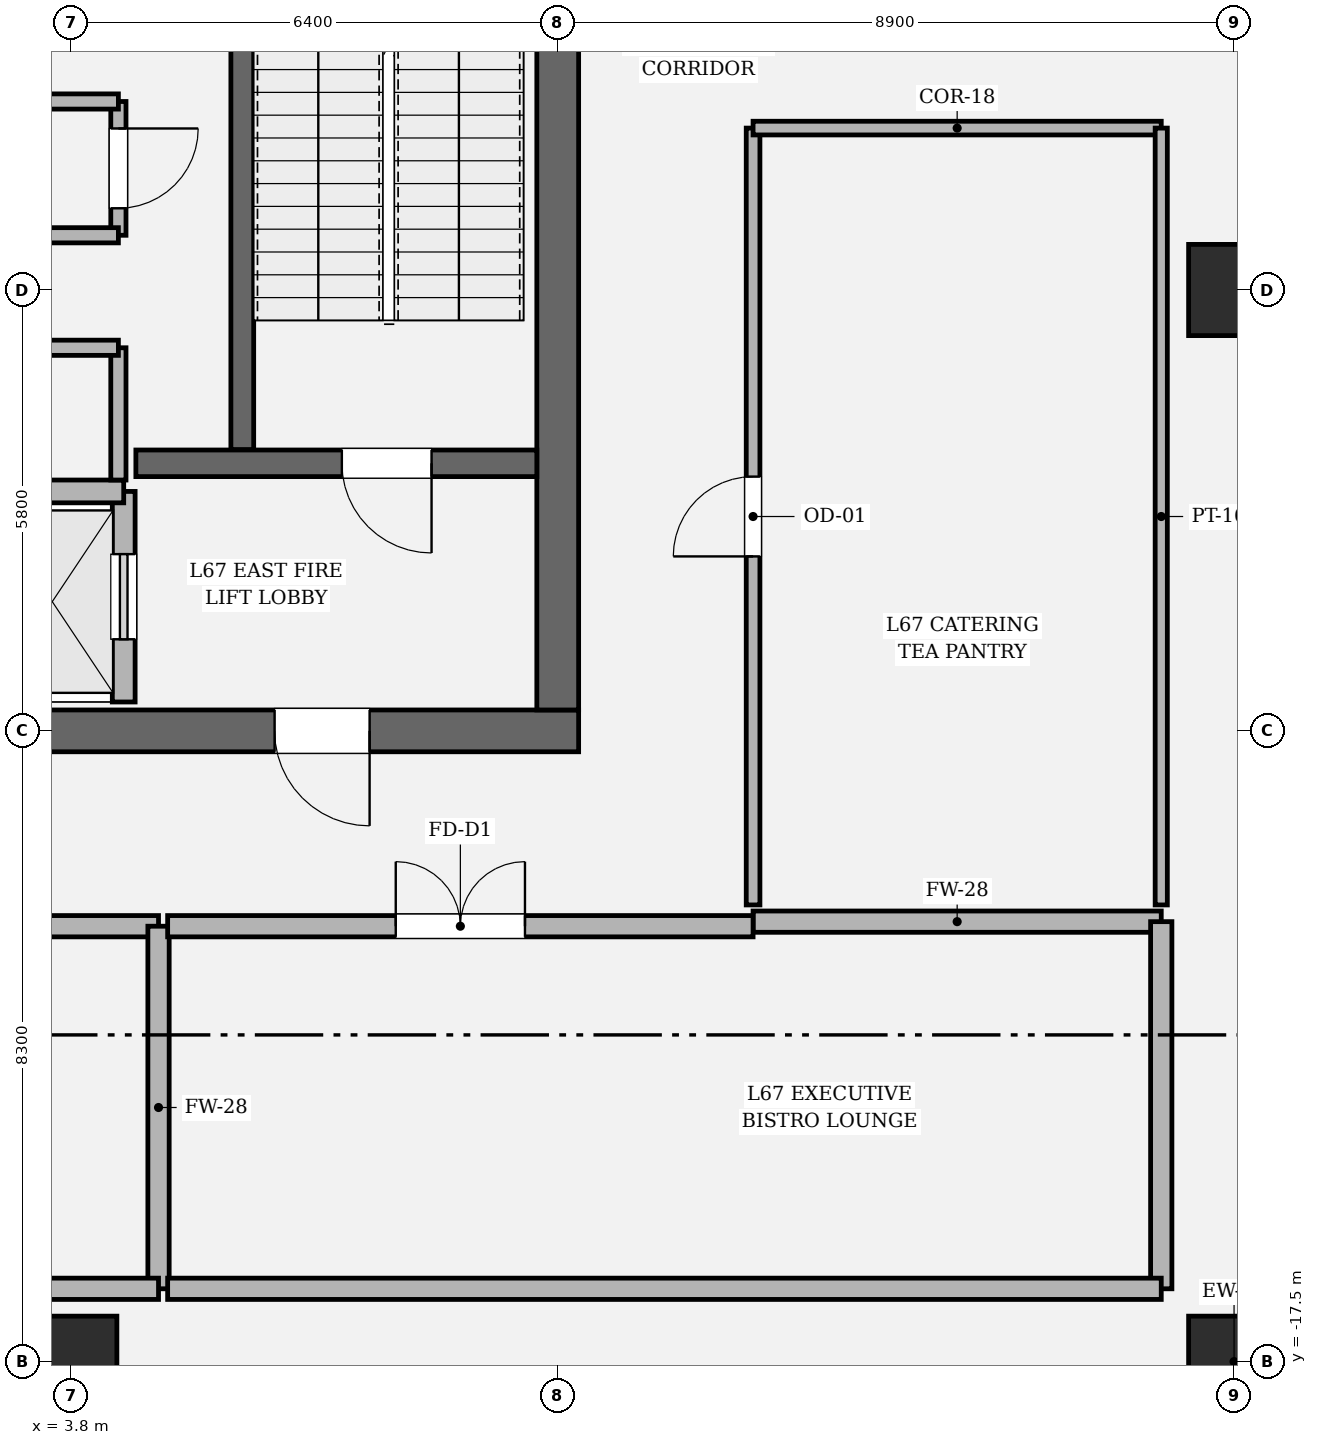
"""IFC4 building model, lengths in metres.
Left out: names, types, materials, properties, quantities, classifications, styles, units other than length and angle.
Written with IfcOpenShell. Run it as: python <this file> out.ifc"""

import sys

from ifc_helpers import new_model, si_unit, direction, frame, frame_2d, origin, origin_2d, place, context, subcontext, project, spatial, rectangle, hollow_rectangle, extrude, element, fill, save


model = new_model("IFC4")
c1 = context("Model", 3, precision=1e-05, world=origin(), true_north=direction((0.0, 1.0)))
c2 = subcontext(c1, "Body", "Model", "MODEL_VIEW")
j1 = project(units=[si_unit("LENGTHUNIT", "METRE"), si_unit("PLANEANGLEUNIT", "RADIAN")], contexts=[c1])
p1 = place(None, origin())
s1 = spatial("IfcSite", under=j1, at=p1, CompositionType="ELEMENT")
p2 = place(p1, origin())
s2 = spatial("IfcBuilding", under=s1, at=p2, CompositionType="ELEMENT")
p3 = place(p2, frame((0.0, 0.0, 283.8)))
s3 = spatial("IfcBuildingStorey", under=s2, at=p3, CompositionType="ELEMENT", Elevation=283.8)
p4 = place(p3, frame((10.475, -9.2, 0.0), z_axis=(0.0, 0.0, 1.0), x_axis=(-1.0, 0.0, 0.0)))
e1 = element("IfcWall", 1, at=p4, inside=s3, PredefinedType="SHEAR", context=c2, shape_type="SweptSolid", body=[
    extrude(rectangle(XDim=20.95, YDim=0.55, at=frame_2d((10.475, 0.0))), origin(), (0.0, 0.0, 1.0), 4.2),
])
p5 = place(p4, frame((2.75, 0.0, 0.0)))
e2 = element("IfcOpeningElement", 2, at=p5, cuts=e1, PredefinedType="OPENING", context=c2, shape_type="SweptSolid", body=[
    extrude(rectangle(XDim=1.25, YDim=2.25, at=frame_2d((0.625, 1.125))), frame((0.0, 0.285, 0.0), z_axis=(0.0, -1.0, 0.0), x_axis=(1.0, 0.0, 0.0)), (0.0, 0.0, 1.0), 0.57),
])
p6 = place(p4, frame((16.95, 0.0, 0.0)))
e3 = element("IfcOpeningElement", 3, at=p6, cuts=e1, PredefinedType="OPENING", context=c2, shape_type="SweptSolid", body=[
    extrude(rectangle(XDim=1.25, YDim=2.25, at=frame_2d((0.625, 1.125))), frame((0.0, 0.285, 0.0), z_axis=(0.0, -1.0, 0.0), x_axis=(1.0, 0.0, 0.0)), (0.0, 0.0, 1.0), 0.57),
])
p7 = place(p3, frame((10.2, 8.925, 0.0), z_axis=(0.0, 0.0, 1.0), x_axis=(0.0, -1.0, 0.0)))
e4 = element("IfcWall", 4, at=p7, inside=s3, PredefinedType="SHEAR", context=c2, shape_type="SweptSolid", body=[
    extrude(rectangle(XDim=17.85, YDim=0.55, at=frame_2d((8.925, 0.0))), origin(), (0.0, 0.0, 1.0), 4.2),
])
p8 = place(p7, frame((3.955, 0.0, 0.0)))
e5 = element("IfcOpeningElement", 5, at=p8, cuts=e4, PredefinedType="OPENING", context=c2, shape_type="SweptSolid", body=[
    extrude(rectangle(XDim=1.18, YDim=2.2, at=frame_2d((0.59, 1.1))), frame((0.0, 0.285, 0.0), z_axis=(0.0, -1.0, 0.0), x_axis=(1.0, 0.0, 0.0)), (0.0, 0.0, 1.0), 0.57),
])
p9 = place(p3, frame((6.05, 3.45, 0.0), z_axis=(0.0, 0.0, 1.0), x_axis=(0.0, -1.0, 0.0)))
e6 = element("IfcWall", 6, at=p9, inside=s3, PredefinedType="SOLIDWALL", context=c2, shape_type="SweptSolid", body=[
    extrude(rectangle(XDim=8.95, YDim=0.3, at=frame_2d((4.475, 0.0))), origin(), (0.0, 0.0, 1.0), 4.2),
])
p10 = place(p3, frame((4.65, -5.68, 0.0), z_axis=(0.0, 0.0, 1.0), x_axis=(1.0, 0.0, 0.0)))
e7 = element("IfcWall", 7, at=p10, inside=s3, PredefinedType="SOLIDWALL", context=c2, shape_type="SweptSolid", body=[
    extrude(rectangle(XDim=5.275, YDim=0.35, at=frame_2d((2.638, 0.0))), origin(), (0.0, 0.0, 1.0), 4.2),
])
p11 = place(p10, frame((2.71, 0.0, 0.0)))
e8 = element("IfcOpeningElement", 8, at=p11, cuts=e7, PredefinedType="OPENING", context=c2, shape_type="SweptSolid", body=[
    extrude(rectangle(XDim=1.18, YDim=2.2, at=frame_2d((0.59, 1.1))), frame((0.0, 0.185, 0.0), z_axis=(0.0, -1.0, 0.0), x_axis=(1.0, 0.0, 0.0)), (0.0, 0.0, 1.0), 0.37),
])
for number, where, z_axis, x_axis in (
    (9, (3.8, -17.5, 0.0), (0.0, 0.0, 1.0), (1.0, 0.0, 0.0)),
    (10, (19.1, -17.5, 0.0), (0.0, 0.0, 1.0), (1.0, 0.0, 0.0)),
    (11, (19.1, -3.4, 0.0), (0.0, 0.0, 1.0), (1.0, 0.0, 0.0)),
):
    element("IfcColumn", number, at=place(p3, frame(where, z_axis=z_axis, x_axis=x_axis)), inside=s3, PredefinedType="COLUMN", context=c2, shape_type="SweptSolid", body=[
        extrude(hollow_rectangle(XDim=1.2, YDim=1.2, WallThickness=0.035, at=origin_2d()), origin(), (0.0, 0.0, 1.0), 4.2),
    ])
p12 = place(p3, frame((18.549, -18.047, 0.0), z_axis=(0.0, 0.0, 1.0), x_axis=(0.707106781187, 0.707106781187, 0.0)))
e12 = element("IfcWall", 12, at=p12, inside=s3, PredefinedType="SOLIDWALL", context=c2, shape_type="SweptSolid", body=[
    extrude(rectangle(XDim=1.552, YDim=0.32, at=frame_2d((0.776, 0.0))), origin(), (0.0, 0.0, 1.0), 3.394),
])
p13 = place(p3, frame((4.49, -8.82, 0.0), z_axis=(0.0, 0.0, 1.0), x_axis=(0.0, 1.0, 0.0)))
e13 = element("IfcWall", 13, at=p13, inside=s3, PredefinedType="SOLIDWALL", context=c2, shape_type="SweptSolid", body=[
    extrude(rectangle(XDim=2.77, YDim=0.3, at=frame_2d((1.385, 0.0))), origin(), (0.0, 0.0, 1.0), 4.0),
])
p14 = place(p13, frame((0.825, 0.0, 0.0)))
e14 = element("IfcOpeningElement", 14, at=p14, cuts=e13, PredefinedType="OPENING", context=c2, shape_type="SweptSolid", body=[
    extrude(rectangle(XDim=1.12, YDim=2.25, at=frame_2d((0.56, 1.125))), frame((0.0, 0.16, 0.0), z_axis=(0.0, -1.0, 0.0), x_axis=(1.0, 0.0, 0.0)), (0.0, 0.0, 1.0), 0.32),
])
p15 = place(p3, frame((2.61, -6.05, 0.0), z_axis=(0.0, 0.0, 1.0), x_axis=(1.0, 0.0, 0.0)))
e15 = element("IfcWall", 15, at=p15, inside=s3, PredefinedType="SOLIDWALL", context=c2, shape_type="SweptSolid", body=[
    extrude(rectangle(XDim=1.88, YDim=0.3, at=frame_2d((0.94, 0.0))), origin(), (0.0, 0.0, 1.0), 4.0),
])
p16 = place(p3, frame((4.42, -5.9, 0.0), z_axis=(0.0, 0.0, 1.0), x_axis=(0.0, 1.0, 0.0)))
e16 = element("IfcWall", 16, at=p16, inside=s3, PredefinedType="SOLIDWALL", context=c2, shape_type="SweptSolid", body=[
    extrude(rectangle(XDim=1.74, YDim=0.2, at=frame_2d((0.87, 0.0))), origin(), (0.0, 0.0, 1.0), 4.0),
])
p17 = place(p3, frame((4.42, -4.16, 0.0), z_axis=(0.0, 0.0, 1.0), x_axis=(-1.0, 0.0, 0.0)))
e17 = element("IfcWall", 17, at=p17, inside=s3, PredefinedType="SOLIDWALL", context=c2, shape_type="SweptSolid", body=[
    extrude(rectangle(XDim=2.84, YDim=0.2, at=frame_2d((1.42, 0.0))), origin(), (0.0, 0.0, 1.0), 4.0),
])
p18 = place(p17, frame((0.945, 0.0, 0.0)))
e18 = element("IfcOpeningElement", 18, at=p18, cuts=e17, PredefinedType="OPENING", context=c2, shape_type="SweptSolid", body=[
    extrude(rectangle(XDim=0.95, YDim=2.15, at=frame_2d((0.475, 1.075))), frame((0.0, 0.11, 0.0), z_axis=(0.0, -1.0, 0.0), x_axis=(1.0, 0.0, 0.0)), (0.0, 0.0, 1.0), 0.22),
])
p19 = place(p3, frame((4.42, -2.68, 0.0), z_axis=(0.0, 0.0, 1.0), x_axis=(0.0, 1.0, 0.0)))
e19 = element("IfcWall", 19, at=p19, inside=s3, PredefinedType="SOLIDWALL", context=c2, shape_type="SweptSolid", body=[
    extrude(rectangle(XDim=1.76, YDim=0.2, at=frame_2d((0.88, 0.0))), origin(), (0.0, 0.0, 1.0), 4.0),
])
p20 = place(p19, frame((0.355, 0.0, 0.0)))
e20 = element("IfcOpeningElement", 20, at=p20, cuts=e19, PredefinedType="OPENING", context=c2, shape_type="SweptSolid", body=[
    extrude(rectangle(XDim=1.05, YDim=2.2, at=frame_2d((0.525, 1.1))), frame((0.0, 0.11, 0.0), z_axis=(0.0, -1.0, 0.0), x_axis=(1.0, 0.0, 0.0)), (0.0, 0.0, 1.0), 0.22),
])
for number, where, z_axis, x_axis in (
    (21, (4.42, -0.92, 0.0), (0.0, 0.0, 1.0), (-1.0, 0.0, 0.0)),
    (22, (2.48, -2.68, 0.0), (0.0, 0.0, 1.0), (1.0, 0.0, 0.0)),
):
    element("IfcWall", number, at=place(p3, frame(where, z_axis=z_axis, x_axis=x_axis)), inside=s3, PredefinedType="SOLIDWALL", context=c2, shape_type="SweptSolid", body=[
        extrude(rectangle(XDim=1.94, YDim=0.2, at=frame_2d((0.97, 0.0))), origin(), (0.0, 0.0, 1.0), 4.0),
    ])
p21 = place(p3, frame((-12.77, -11.77, 0.0), z_axis=(0.0, 0.0, 1.0), x_axis=(1.0, 0.0, 0.0)))
e23 = element("IfcWall", 23, at=p21, inside=s3, PredefinedType="SOLIDWALL", context=c2, shape_type="SweptSolid", body=[
    extrude(rectangle(XDim=17.718, YDim=0.28, at=frame_2d((8.859, 0.0))), origin(), (0.0, 0.0, 1.0), 3.394),
])
p22 = place(p21, frame((8.009, 0.0, 0.0)))
e24 = element("IfcOpeningElement", 24, at=p22, cuts=e23, PredefinedType="OPENING", context=c2, shape_type="SweptSolid", body=[
    extrude(rectangle(XDim=1.7, YDim=2.3, at=frame_2d((0.85, 1.15))), frame((0.0, 0.15, 0.0), z_axis=(0.0, -1.0, 0.0), x_axis=(1.0, 0.0, 0.0)), (0.0, 0.0, 1.0), 0.3),
])
p23 = place(p3, frame((4.948, -11.77, 0.0), z_axis=(0.0, 0.0, 1.0), x_axis=(0.0, -1.0, 0.0)))
e25 = element("IfcWall", 25, at=p23, inside=s3, PredefinedType="SOLIDWALL", context=c2, shape_type="SweptSolid", body=[
    extrude(rectangle(XDim=4.77, YDim=0.28, at=frame_2d((2.385, 0.0))), origin(), (0.0, 0.0, 1.0), 4.0),
])
p24 = place(p3, frame((4.948, -16.54, 0.0), z_axis=(0.0, 0.0, 1.0), x_axis=(-1.0, 0.0, 0.0)))
e26 = element("IfcWall", 26, at=p24, inside=s3, PredefinedType="SOLIDWALL", context=c2, shape_type="SweptSolid", body=[
    extrude(rectangle(XDim=28.988, YDim=0.28, at=frame_2d((14.494, 0.0))), origin(), (0.0, 0.0, 1.0), 3.394),
])
p25 = place(p3, frame((12.77, -11.71, 0.0), z_axis=(0.0, 0.0, 1.0), x_axis=(1.0, 0.0, 0.0)))
e27 = element("IfcWall", 27, at=p25, inside=s3, PredefinedType="SOLIDWALL", context=c2, shape_type="SweptSolid", body=[
    extrude(rectangle(XDim=5.37, YDim=0.28, at=frame_2d((2.685, 0.0))), origin(), (0.0, 0.0, 1.0), 3.634),
])
p26 = place(p3, frame((18.14, -11.71, 0.0), z_axis=(0.0, 0.0, 1.0), x_axis=(0.0, -1.0, 0.0)))
e28 = element("IfcWall", 28, at=p26, inside=s3, PredefinedType="SOLIDWALL", context=c2, shape_type="SweptSolid", body=[
    extrude(rectangle(XDim=4.83, YDim=0.28, at=frame_2d((2.415, 0.0))), origin(), (0.0, 0.0, 1.0), 3.634),
])
p27 = place(p3, frame((18.14, -16.54, 0.0), z_axis=(0.0, 0.0, 1.0), x_axis=(-1.0, 0.0, 0.0)))
e29 = element("IfcWall", 29, at=p27, inside=s3, PredefinedType="SOLIDWALL", context=c2, shape_type="SweptSolid", body=[
    extrude(rectangle(XDim=13.072, YDim=0.28, at=frame_2d((6.536, 0.0))), origin(), (0.0, 0.0, 1.0), 3.394),
])
p28 = place(p3, frame((5.068, -11.77, 0.0), z_axis=(0.0, 0.0, 1.0), x_axis=(1.0, 0.0, 0.0)))
e30 = element("IfcWall", 30, at=p28, inside=s3, PredefinedType="SOLIDWALL", context=c2, shape_type="SweptSolid", body=[
    extrude(rectangle(XDim=7.702, YDim=0.28, at=frame_2d((3.851, 0.0))), origin(), (0.0, 0.0, 1.0), 3.394),
])
p29 = place(p28, frame((3.001, 0.0, 0.0)))
e31 = element("IfcOpeningElement", 31, at=p29, cuts=e30, PredefinedType="OPENING", context=c2, shape_type="SweptSolid", body=[
    extrude(rectangle(XDim=1.7, YDim=2.3, at=frame_2d((0.85, 1.15))), frame((0.0, 0.15, 0.0), z_axis=(0.0, -1.0, 0.0), x_axis=(1.0, 0.0, 0.0)), (0.0, 0.0, 1.0), 0.3),
])
p30 = place(p3, frame((12.77, -11.49, 0.0), z_axis=(0.0, 0.0, 1.0), x_axis=(0.0, 1.0, 0.0)))
e32 = element("IfcWall", 32, at=p30, inside=s3, PredefinedType="PARTITIONING", context=c2, shape_type="SweptSolid", body=[
    extrude(rectangle(XDim=10.22, YDim=0.18, at=frame_2d((5.11, 0.0))), origin(), (0.0, 0.0, 1.0), 3.394),
])
p31 = place(p30, frame((4.585, 0.0, 0.0)))
e33 = element("IfcOpeningElement", 33, at=p31, cuts=e32, PredefinedType="OPENING", context=c2, shape_type="SweptSolid", body=[
    extrude(rectangle(XDim=1.05, YDim=2.2, at=frame_2d((0.525, 1.1))), frame((0.0, 0.1, 0.0), z_axis=(0.0, -1.0, 0.0), x_axis=(1.0, 0.0, 0.0)), (0.0, 0.0, 1.0), 0.2),
])
p32 = place(p3, frame((12.77, -1.27, 0.0), z_axis=(0.0, 0.0, 1.0), x_axis=(1.0, 0.0, 0.0)))
e34 = element("IfcWall", 34, at=p32, inside=s3, PredefinedType="PARTITIONING", context=c2, shape_type="SweptSolid", body=[
    extrude(rectangle(XDim=5.37, YDim=0.18, at=frame_2d((2.685, 0.0))), origin(), (0.0, 0.0, 1.0), 4.0),
])
p33 = place(p3, frame((18.14, -1.27, 0.0), z_axis=(0.0, 0.0, 1.0), x_axis=(0.0, -1.0, 0.0)))
e35 = element("IfcWall", 35, at=p33, inside=s3, PredefinedType="PARTITIONING", context=c2, shape_type="SweptSolid", body=[
    extrude(rectangle(XDim=10.22, YDim=0.16, at=frame_2d((5.11, 0.0))), origin(), (0.0, 0.0, 1.0), 3.394),
])
p34 = place(p11, origin())
e36 = element("IfcDoor", 36, at=p34, inside=s3, OperationType="SINGLE_SWING_RIGHT", PredefinedType="DOOR", context=c2, shape_type="SweptSolid", body=[
    extrude(rectangle(XDim=1.18, YDim=2.2, at=frame_2d((0.59, 1.1))), frame((0.0, 0.025, 0.0), z_axis=(0.0, -1.0, 0.0), x_axis=(1.0, 0.0, 0.0)), (0.0, 0.0, 1.0), 0.05),
])
fill(e8, e36)
p35 = place(p5, origin())
e37 = element("IfcDoor", 37, at=p35, inside=s3, OperationType="SINGLE_SWING_LEFT", PredefinedType="DOOR", context=c2, shape_type="SweptSolid", body=[
    extrude(rectangle(XDim=1.25, YDim=2.25, at=frame_2d((0.625, 1.125))), frame((0.0, 0.025, 0.0), z_axis=(0.0, -1.0, 0.0), x_axis=(1.0, 0.0, 0.0)), (0.0, 0.0, 1.0), 0.05),
])
fill(e2, e37)
p36 = place(p14, origin())
e38 = element("IfcDoor", 38, at=p36, inside=s3, OperationType="SLIDING_TO_RIGHT", PredefinedType="DOOR", context=c2, shape_type="SweptSolid", body=[
    extrude(rectangle(XDim=1.12, YDim=2.25, at=frame_2d((0.56, 1.125))), frame((0.0, 0.025, 0.0), z_axis=(0.0, -1.0, 0.0), x_axis=(1.0, 0.0, 0.0)), (0.0, 0.0, 1.0), 0.05),
])
fill(e14, e38)
p37 = place(p20, origin())
e39 = element("IfcDoor", 39, at=p37, inside=s3, OperationType="SINGLE_SWING_RIGHT", PredefinedType="DOOR", context=c2, shape_type="SweptSolid", body=[
    extrude(rectangle(XDim=1.05, YDim=2.2, at=frame_2d((0.525, 1.1))), frame((0.0, 0.025, 0.0), z_axis=(0.0, -1.0, 0.0), x_axis=(1.0, 0.0, 0.0)), (0.0, 0.0, 1.0), 0.05),
])
fill(e20, e39)
p38 = place(p29, origin())
e40 = element("IfcDoor", 40, at=p38, inside=s3, OperationType="DOUBLE_DOOR_SINGLE_SWING", PredefinedType="DOOR", context=c2, shape_type="SweptSolid", body=[
    extrude(rectangle(XDim=1.7, YDim=2.3, at=frame_2d((0.85, 1.15))), frame((0.0, 0.025, 0.0), z_axis=(0.0, -1.0, 0.0), x_axis=(1.0, 0.0, 0.0)), (0.0, 0.0, 1.0), 0.05),
])
fill(e31, e40)
p39 = place(p31, origin())
e41 = element("IfcDoor", 41, at=p39, inside=s3, OperationType="SINGLE_SWING_LEFT", PredefinedType="DOOR", context=c2, shape_type="SweptSolid", body=[
    extrude(rectangle(XDim=1.05, YDim=2.2, at=frame_2d((0.525, 1.1))), frame((0.0, 0.025, 0.0), z_axis=(0.0, -1.0, 0.0), x_axis=(1.0, 0.0, 0.0)), (0.0, 0.0, 1.0), 0.05),
])
fill(e33, e41)
save(model, sys.argv[1])
